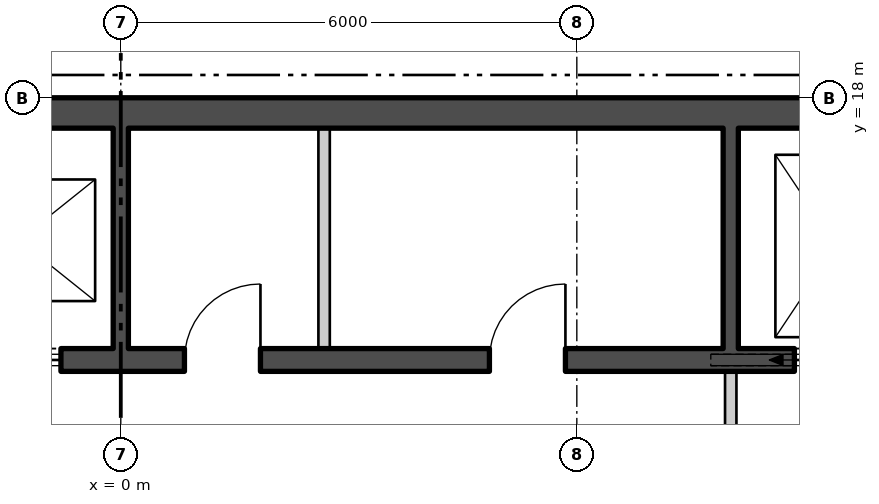
"""IFC4 building model, lengths in metres.
Left out: names, types, materials, properties, quantities, classifications, styles, units other than length and angle.
Written with IfcOpenShell. Run it as: python <this file> out.ifc"""

import sys

from ifc_helpers import new_model, si_unit, direction, frame, frame_2d, origin, place, context, subcontext, project, spatial, rectangle, extrude, element, fill, save


model = new_model("IFC4")
c1 = context("Model", 3, precision=1e-05, world=origin(), true_north=direction((0.0, 1.0)))
c2 = subcontext(c1, "Body", "Model", "MODEL_VIEW")
j1 = project(units=[si_unit("LENGTHUNIT", "METRE"), si_unit("PLANEANGLEUNIT", "RADIAN")], contexts=[c1])
p1 = place(None, origin())
s1 = spatial("IfcSite", under=j1, at=p1, CompositionType="ELEMENT")
p2 = place(p1, origin())
s2 = spatial("IfcBuilding", under=s1, at=p2, CompositionType="ELEMENT")
p3 = place(p2, frame((0.0, 0.0, 292.2)))
s3 = spatial("IfcBuildingStorey", under=s2, at=p3, CompositionType="ELEMENT", Elevation=292.2)
p4 = place(p3, frame((-14.5, 17.8, 0.0), z_axis=(0.0, 0.0, 1.0), x_axis=(1.0, 0.0, 0.0)))
e1 = element("IfcWall", 1, at=p4, inside=s3, PredefinedType="SHEAR", context=c2, shape_type="SweptSolid", body=[
    extrude(rectangle(XDim=29.0, YDim=0.4, at=frame_2d((14.5, 0.0))), origin(), (0.0, 0.0, 1.0), 5.7),
])
p5 = place(p3, frame((-10.7, 14.55, 0.0), z_axis=(0.0, 0.0, 1.0), x_axis=(1.0, 0.0, 0.0)))
e2 = element("IfcWall", 2, at=p5, inside=s3, PredefinedType="SHEAR", context=c2, shape_type="SweptSolid", body=[
    extrude(rectangle(XDim=21.4, YDim=0.3, at=frame_2d((10.7, 0.0))), origin(), (0.0, 0.0, 1.0), 5.7),
])
p6 = place(p5, frame((0.738, 0.0, 0.0)))
e3 = element("IfcOpeningElement", 3, at=p6, cuts=e2, PredefinedType="OPENING", context=c2, shape_type="SweptSolid", body=[
    extrude(rectangle(XDim=1.1, YDim=2.1, at=frame_2d((0.55, 1.05))), frame((0.0, 0.16, 0.0), z_axis=(0.0, -1.0, 0.0), x_axis=(1.0, 0.0, 0.0)), (0.0, 0.0, 1.0), 0.32),
])
p7 = place(p5, frame((3.462, 0.0, 0.0)))
e4 = element("IfcOpeningElement", 4, at=p7, cuts=e2, PredefinedType="OPENING", context=c2, shape_type="SweptSolid", body=[
    extrude(rectangle(XDim=1.1, YDim=2.1, at=frame_2d((0.55, 1.05))), frame((0.0, 0.16, 0.0), z_axis=(0.0, -1.0, 0.0), x_axis=(1.0, 0.0, 0.0)), (0.0, 0.0, 1.0), 0.32),
])
p8 = place(p5, frame((6.138, 0.0, 0.0)))
e5 = element("IfcOpeningElement", 5, at=p8, cuts=e2, PredefinedType="OPENING", context=c2, shape_type="SweptSolid", body=[
    extrude(rectangle(XDim=1.1, YDim=2.1, at=frame_2d((0.55, 1.05))), frame((0.0, 0.16, 0.0), z_axis=(0.0, -1.0, 0.0), x_axis=(1.0, 0.0, 0.0)), (0.0, 0.0, 1.0), 0.32),
])
p9 = place(p5, frame((8.812, 0.0, 0.0)))
e6 = element("IfcOpeningElement", 6, at=p9, cuts=e2, PredefinedType="OPENING", context=c2, shape_type="SweptSolid", body=[
    extrude(rectangle(XDim=1.1, YDim=2.1, at=frame_2d((0.55, 1.05))), frame((0.0, 0.16, 0.0), z_axis=(0.0, -1.0, 0.0), x_axis=(1.0, 0.0, 0.0)), (0.0, 0.0, 1.0), 0.32),
])
p10 = place(p5, frame((19.562, 0.0, 0.0)))
e7 = element("IfcOpeningElement", 7, at=p10, cuts=e2, PredefinedType="OPENING", context=c2, shape_type="SweptSolid", body=[
    extrude(rectangle(XDim=1.1, YDim=2.1, at=frame_2d((0.55, 1.05))), frame((0.0, 0.16, 0.0), z_axis=(0.0, -1.0, 0.0), x_axis=(1.0, 0.0, 0.0)), (0.0, 0.0, 1.0), 0.32),
])
p11 = place(p5, frame((11.537, 0.0, 0.0)))
e8 = element("IfcOpeningElement", 8, at=p11, cuts=e2, PredefinedType="OPENING", context=c2, shape_type="SweptSolid", body=[
    extrude(rectangle(XDim=1.0, YDim=2.1, at=frame_2d((0.5, 1.05))), frame((0.0, 0.16, 0.0), z_axis=(0.0, -1.0, 0.0), x_axis=(1.0, 0.0, 0.0)), (0.0, 0.0, 1.0), 0.32),
])
p12 = place(p5, frame((15.55, 0.0, 0.0)))
e9 = element("IfcOpeningElement", 9, at=p12, cuts=e2, PredefinedType="OPENING", context=c2, shape_type="SweptSolid", body=[
    extrude(rectangle(XDim=1.0, YDim=2.1, at=frame_2d((0.5, 1.05))), frame((0.0, 0.16, 0.0), z_axis=(0.0, -1.0, 0.0), x_axis=(1.0, 0.0, 0.0)), (0.0, 0.0, 1.0), 0.32),
])
p13 = place(p3, frame((0.0, 14.7, 0.0), z_axis=(0.0, 0.0, 1.0), x_axis=(0.0, 1.0, 0.0)))
e10 = element("IfcWall", 10, at=p13, inside=s3, PredefinedType="SHEAR", context=c2, shape_type="SweptSolid", body=[
    extrude(rectangle(XDim=2.9, YDim=0.2, at=frame_2d((1.45, 0.0))), origin(), (0.0, 0.0, 1.0), 5.7),
])
p14 = place(p3, frame((2.675, 14.7, 0.0), z_axis=(0.0, 0.0, 1.0), x_axis=(0.0, 1.0, 0.0)))
e11 = element("IfcWall", 11, at=p14, inside=s3, PredefinedType="PARTITIONING", context=c2, shape_type="SweptSolid", body=[
    extrude(rectangle(XDim=2.9, YDim=0.15, at=frame_2d((1.45, 0.0))), origin(), (0.0, 0.0, 1.0), 5.7),
])
p15 = place(p3, frame((8.025, 14.7, 0.0), z_axis=(0.0, 0.0, 1.0), x_axis=(0.0, 1.0, 0.0)))
e12 = element("IfcWall", 12, at=p15, inside=s3, PredefinedType="SHEAR", context=c2, shape_type="SweptSolid", body=[
    extrude(rectangle(XDim=2.9, YDim=0.2, at=frame_2d((1.45, 0.0))), origin(), (0.0, 0.0, 1.0), 5.7),
])
p16 = place(p3, frame((8.025, 10.8, 0.0), z_axis=(0.0, 0.0, 1.0), x_axis=(0.0, 1.0, 0.0)))
e13 = element("IfcWall", 13, at=p16, inside=s3, PredefinedType="PARTITIONING", context=c2, shape_type="SweptSolid", body=[
    extrude(rectangle(XDim=3.6, YDim=0.15, at=frame_2d((1.8, 0.0))), origin(), (0.0, 0.0, 1.0), 5.7),
])
p17 = place(p16, frame((1.175, 0.0, 0.0)))
e14 = element("IfcOpeningElement", 14, at=p17, cuts=e13, PredefinedType="OPENING", context=c2, shape_type="SweptSolid", body=[
    extrude(rectangle(XDim=1.25, YDim=2.1, at=frame_2d((0.625, 1.05))), frame((0.0, 0.085, 0.0), z_axis=(0.0, -1.0, 0.0), x_axis=(1.0, 0.0, 0.0)), (0.0, 0.0, 1.0), 0.17),
])
p18 = place(p9, origin())
e15 = element("IfcDoor", 15, at=p18, inside=s3, OperationType="SLIDING_TO_LEFT", PredefinedType="DOOR", context=c2, shape_type="SweptSolid", body=[
    extrude(rectangle(XDim=1.1, YDim=2.1, at=frame_2d((0.55, 1.05))), frame((0.0, 0.025, 0.0), z_axis=(0.0, -1.0, 0.0), x_axis=(1.0, 0.0, 0.0)), (0.0, 0.0, 1.0), 0.05),
])
fill(e6, e15)
p19 = place(p10, origin())
e16 = element("IfcDoor", 16, at=p19, inside=s3, OperationType="SLIDING_TO_LEFT", PredefinedType="DOOR", context=c2, shape_type="SweptSolid", body=[
    extrude(rectangle(XDim=1.1, YDim=2.1, at=frame_2d((0.55, 1.05))), frame((0.0, 0.025, 0.0), z_axis=(0.0, -1.0, 0.0), x_axis=(1.0, 0.0, 0.0)), (0.0, 0.0, 1.0), 0.05),
])
fill(e7, e16)
p20 = place(p11, origin())
e17 = element("IfcDoor", 17, at=p20, inside=s3, OperationType="SINGLE_SWING_LEFT", PredefinedType="DOOR", context=c2, shape_type="SweptSolid", body=[
    extrude(rectangle(XDim=1.0, YDim=2.1, at=frame_2d((0.5, 1.05))), frame((0.0, 0.025, 0.0), z_axis=(0.0, -1.0, 0.0), x_axis=(1.0, 0.0, 0.0)), (0.0, 0.0, 1.0), 0.05),
])
fill(e8, e17)
p21 = place(p12, origin())
e18 = element("IfcDoor", 18, at=p21, inside=s3, OperationType="SINGLE_SWING_LEFT", PredefinedType="DOOR", context=c2, shape_type="SweptSolid", body=[
    extrude(rectangle(XDim=1.0, YDim=2.1, at=frame_2d((0.5, 1.05))), frame((0.0, 0.025, 0.0), z_axis=(0.0, -1.0, 0.0), x_axis=(1.0, 0.0, 0.0)), (0.0, 0.0, 1.0), 0.05),
])
fill(e9, e18)
save(model, sys.argv[1])
